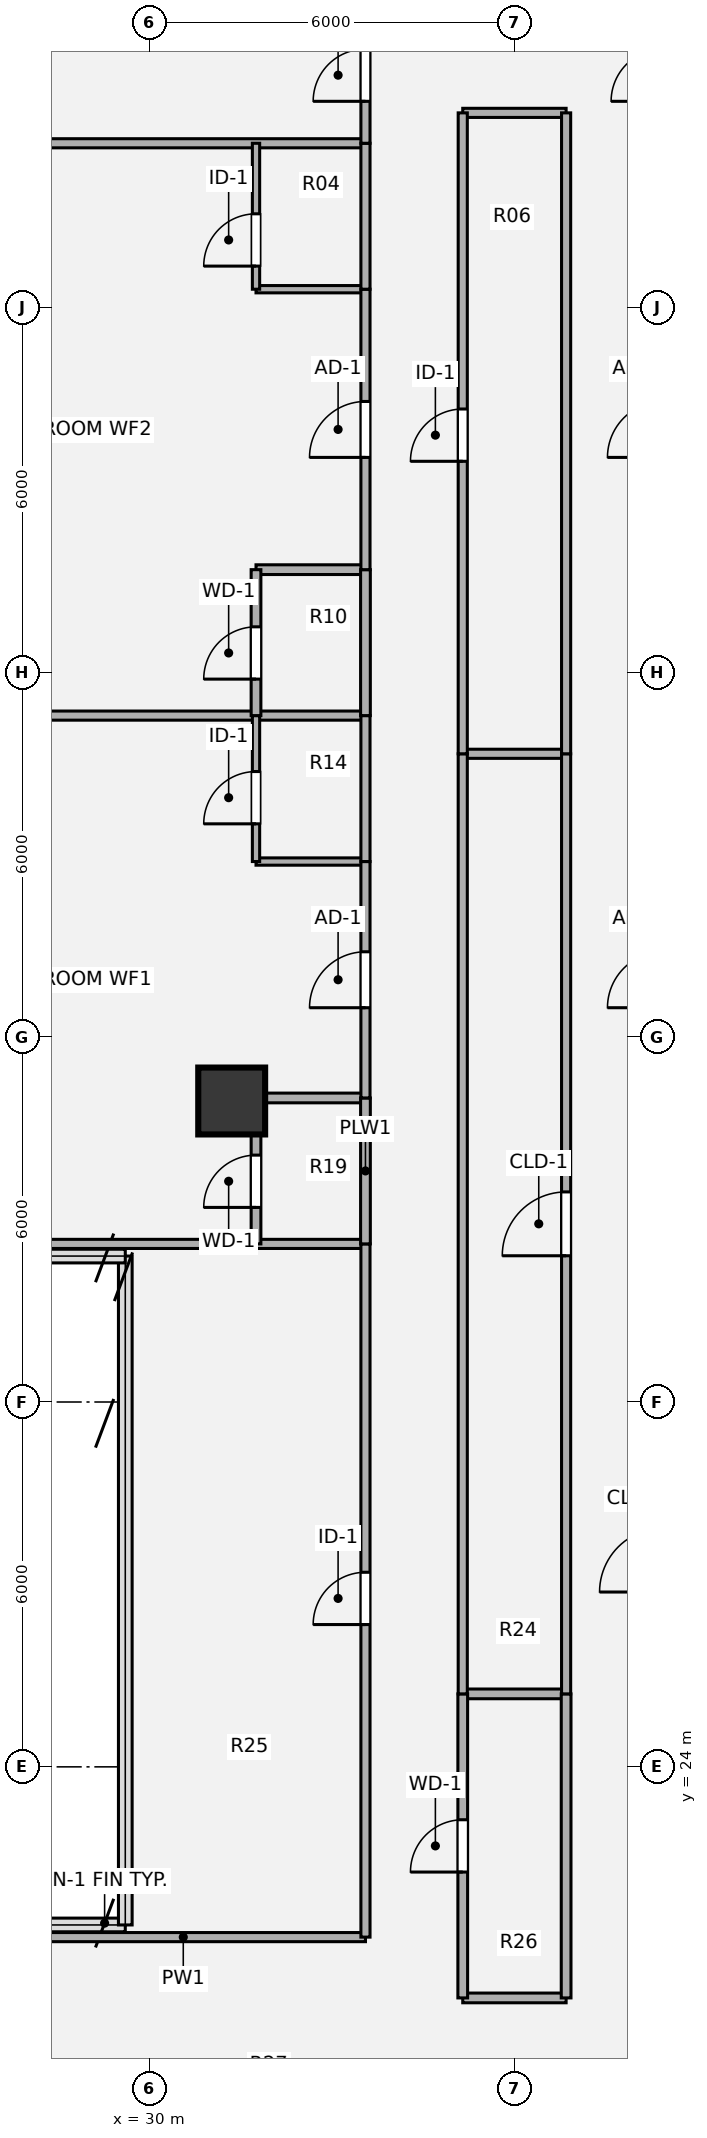
"""IFC4 building model, lengths in metres.
Left out: names, types, materials, properties, quantities, classifications, styles, units other than length and angle.
Written with IfcOpenShell. Run it as: python <this file> out.ifc"""

import sys

from ifc_helpers import new_model, si_unit, direction, frame, frame_2d, origin, origin_2d, place, context, subcontext, project, spatial, rectangle, hollow_circle, extrude, source, transform, mapped, element, fill, save


model = new_model("IFC4")
c1 = context("Model", 3, precision=1e-05, world=origin(), true_north=direction((0.0, 1.0)))
c2 = subcontext(c1, "Body", "Model", "MODEL_VIEW")
j1 = project(units=[si_unit("LENGTHUNIT", "METRE"), si_unit("PLANEANGLEUNIT", "RADIAN")], contexts=[c1])
p1 = place(None, origin())
s1 = spatial("IfcSite", under=j1, at=p1, CompositionType="ELEMENT")
p2 = place(p1, origin())
s2 = spatial("IfcBuilding", under=s1, at=p2, CompositionType="ELEMENT")
p3 = place(p2, frame((0.0, 0.0, 156.42)))
s3 = spatial("IfcBuildingStorey", under=s2, at=p3, CompositionType="ELEMENT", Elevation=156.42)
m1 = source(origin(), c2, "Body", "SweptSolid", [
    extrude(hollow_circle(Radius=0.55, WallThickness=0.04, at=origin_2d()), origin(), (0.0, 0.0, 1.0), 3.78),
])
p4 = place(p3, frame((31.35, 34.95, 0.0), z_axis=(0.0, 0.0, 1.0), x_axis=(1.0, 0.0, 0.0)))
e1 = element("IfcColumn", 1, at=p4, inside=s3, PredefinedType="COLUMN", context=c2, shape_type="MappedRepresentation", body=[
    mapped(m1, transform((0.0, 0.0, 0.0), x_axis=(1.0, 0.0, 0.0), y_axis=(0.0, 1.0, 0.0), z_axis=(0.0, 0.0, 1.0), scale=1.0)),
])
p5 = place(p3, frame((35.15, 20.2, 0.0), z_axis=(0.0, 0.0, 1.0), x_axis=(1.0, 0.0, 0.0)))
e2 = element("IfcWall", 2, at=p5, inside=s3, PredefinedType="PLUMBINGWALL", context=c2, shape_type="SweptSolid", body=[
    extrude(rectangle(XDim=1.7, YDim=0.16, at=frame_2d((0.85, 0.0))), origin(), (0.0, 0.0, 1.0), 3.5),
])
p6 = place(p3, frame((27.558, 21.2, 0.0), z_axis=(0.0, 0.0, 1.0), x_axis=(1.0, 0.0, 0.0)))
e3 = element("IfcWall", 3, at=p6, inside=s3, PredefinedType="PARTITIONING", context=c2, shape_type="SweptSolid", body=[
    extrude(rectangle(XDim=5.992, YDim=0.15, at=frame_2d((2.996, 0.0))), origin(), (0.0, 0.0, 1.0), 3.5),
])
p7 = place(p3, frame((35.15, 25.2, 0.0), z_axis=(0.0, 0.0, 1.0), x_axis=(1.0, 0.0, 0.0)))
e4 = element("IfcWall", 4, at=p7, inside=s3, PredefinedType="PLUMBINGWALL", context=c2, shape_type="SweptSolid", body=[
    extrude(rectangle(XDim=1.7, YDim=0.16, at=frame_2d((0.85, 0.0))), origin(), (0.0, 0.0, 1.0), 3.5),
])
p8 = place(p3, frame((27.557, 32.6, 0.0), z_axis=(0.0, 0.0, 1.0), x_axis=(1.0, 0.0, 0.0)))
e5 = element("IfcWall", 5, at=p8, inside=s3, PredefinedType="PARTITIONING", context=c2, shape_type="SweptSolid", body=[
    extrude(rectangle(XDim=5.993, YDim=0.15, at=frame_2d((2.997, 0.0))), origin(), (0.0, 0.0, 1.0), 3.5),
])
p9 = place(p3, frame((31.75, 35.0, 0.0), z_axis=(0.0, 0.0, 1.0), x_axis=(1.0, 0.0, 0.0)))
e6 = element("IfcWall", 6, at=p9, inside=s3, PredefinedType="PLUMBINGWALL", context=c2, shape_type="SweptSolid", body=[
    extrude(rectangle(XDim=1.8, YDim=0.16, at=frame_2d((0.9, 0.0))), origin(), (0.0, 0.0, 1.0), 2.903),
])
p10 = place(p3, frame((31.75, 38.888, 0.0), z_axis=(0.0, 0.0, 1.0), x_axis=(1.0, 0.0, 0.0)))
e7 = element("IfcWall", 7, at=p10, inside=s3, PredefinedType="PARTITIONING", context=c2, shape_type="SweptSolid", body=[
    extrude(rectangle(XDim=1.8, YDim=0.12, at=frame_2d((0.9, 0.0))), origin(), (0.0, 0.0, 1.0), 3.259),
])
p11 = place(p3, frame((35.15, 40.66, 0.0), z_axis=(0.0, 0.0, 1.0), x_axis=(1.0, 0.0, 0.0)))
e8 = element("IfcWall", 8, at=p11, inside=s3, PredefinedType="PARTITIONING", context=c2, shape_type="SweptSolid", body=[
    extrude(rectangle(XDim=1.7, YDim=0.15, at=frame_2d((0.85, 0.0))), origin(), (0.0, 0.0, 1.0), 3.259),
])
p12 = place(p3, frame((15.88, 41.288, 0.0), z_axis=(0.0, 0.0, 1.0), x_axis=(1.0, 0.0, 0.0)))
e9 = element("IfcWall", 9, at=p12, inside=s3, PredefinedType="PARTITIONING", context=c2, shape_type="SweptSolid", body=[
    extrude(rectangle(XDim=17.67, YDim=0.15, at=frame_2d((8.835, 0.0))), origin(), (0.0, 0.0, 1.0), 2.982),
])
p13 = place(p3, frame((31.75, 43.688, 0.0), z_axis=(0.0, 0.0, 1.0), x_axis=(1.0, 0.0, 0.0)))
e10 = element("IfcWall", 10, at=p13, inside=s3, PredefinedType="PLUMBINGWALL", context=c2, shape_type="SweptSolid", body=[
    extrude(rectangle(XDim=1.8, YDim=0.16, at=frame_2d((0.9, 0.0))), origin(), (0.0, 0.0, 1.0), 3.259),
])
p14 = place(p3, frame((31.75, 48.3, 0.0), z_axis=(0.0, 0.0, 1.0), x_axis=(1.0, 0.0, 0.0)))
e11 = element("IfcWall", 11, at=p14, inside=s3, PredefinedType="PARTITIONING", context=c2, shape_type="SweptSolid", body=[
    extrude(rectangle(XDim=1.8, YDim=0.12, at=frame_2d((0.9, 0.0))), origin(), (0.0, 0.0, 1.0), 3.259),
])
p15 = place(p3, frame((15.981, 50.7, 0.0), z_axis=(0.0, 0.0, 1.0), x_axis=(1.0, 0.0, 0.0)))
e12 = element("IfcWall", 12, at=p15, inside=s3, PredefinedType="PARTITIONING", context=c2, shape_type="SweptSolid", body=[
    extrude(rectangle(XDim=17.569, YDim=0.15, at=frame_2d((8.785, 0.0))), origin(), (0.0, 0.0, 1.0), 3.308),
])
p16 = place(p3, frame((35.15, 51.2, 0.0), z_axis=(0.0, 0.0, 1.0), x_axis=(1.0, 0.0, 0.0)))
e13 = element("IfcWall", 13, at=p16, inside=s3, PredefinedType="PARTITIONING", context=c2, shape_type="SweptSolid", body=[
    extrude(rectangle(XDim=1.7, YDim=0.15, at=frame_2d((0.85, 0.0))), origin(), (0.0, 0.0, 1.0), 3.308),
])
p17 = place(p3, frame((31.75, 32.6, 0.0), z_axis=(0.0, 0.0, 1.0), x_axis=(0.0, 1.0, 0.0)))
e14 = element("IfcWall", 14, at=p17, inside=s3, PredefinedType="PLUMBINGWALL", context=c2, shape_type="SweptSolid", body=[
    extrude(rectangle(XDim=2.4, YDim=0.16, at=frame_2d((1.2, 0.0))), origin(), (0.0, 0.0, 1.0), 3.5),
])
p18 = place(p17, frame((0.6, 0.0, 0.0)))
e15 = element("IfcOpeningElement", 15, at=p18, cuts=e14, PredefinedType="OPENING", context=c2, shape_type="SweptSolid", body=[
    extrude(rectangle(XDim=0.86, YDim=2.1, at=origin_2d()), frame((0.43, 0.09, 1.05), z_axis=(0.0, -1.0, 0.0), x_axis=(1.0, 0.0, 0.0)), (0.0, 0.0, 1.0), 0.18),
])
p19 = place(p3, frame((31.75, 38.888, 0.0), z_axis=(0.0, 0.0, 1.0), x_axis=(0.0, 1.0, 0.0)))
e16 = element("IfcWall", 16, at=p19, inside=s3, PredefinedType="PARTITIONING", context=c2, shape_type="SweptSolid", body=[
    extrude(rectangle(XDim=2.4, YDim=0.12, at=frame_2d((1.2, 0.0))), origin(), (0.0, 0.0, 1.0), 3.5),
])
p20 = place(p19, frame((0.62, 0.0, 0.0)))
e17 = element("IfcOpeningElement", 17, at=p20, cuts=e16, PredefinedType="OPENING", context=c2, shape_type="SweptSolid", body=[
    extrude(rectangle(XDim=0.86, YDim=2.1, at=origin_2d()), frame((0.43, 0.07, 1.05), z_axis=(0.0, -1.0, 0.0), x_axis=(1.0, 0.0, 0.0)), (0.0, 0.0, 1.0), 0.14),
])
p21 = place(p3, frame((31.75, 41.288, 0.0), z_axis=(0.0, 0.0, 1.0), x_axis=(0.0, 1.0, 0.0)))
e18 = element("IfcWall", 18, at=p21, inside=s3, PredefinedType="PLUMBINGWALL", context=c2, shape_type="SweptSolid", body=[
    extrude(rectangle(XDim=2.4, YDim=0.16, at=frame_2d((1.2, 0.0))), origin(), (0.0, 0.0, 1.0), 3.5),
])
p22 = place(p21, frame((0.6, 0.0, 0.0)))
e19 = element("IfcOpeningElement", 19, at=p22, cuts=e18, PredefinedType="OPENING", context=c2, shape_type="SweptSolid", body=[
    extrude(rectangle(XDim=0.86, YDim=2.1, at=origin_2d()), frame((0.43, 0.09, 1.05), z_axis=(0.0, -1.0, 0.0), x_axis=(1.0, 0.0, 0.0)), (0.0, 0.0, 1.0), 0.18),
])
p23 = place(p3, frame((31.75, 48.3, 0.0), z_axis=(0.0, 0.0, 1.0), x_axis=(0.0, 1.0, 0.0)))
e20 = element("IfcWall", 20, at=p23, inside=s3, PredefinedType="PARTITIONING", context=c2, shape_type="SweptSolid", body=[
    extrude(rectangle(XDim=2.4, YDim=0.12, at=frame_2d((1.2, 0.0))), origin(), (0.0, 0.0, 1.0), 3.5),
])
p24 = place(p23, frame((0.38, 0.0, 0.0)))
e21 = element("IfcOpeningElement", 21, at=p24, cuts=e20, PredefinedType="OPENING", context=c2, shape_type="SweptSolid", body=[
    extrude(rectangle(XDim=0.86, YDim=2.1, at=origin_2d()), frame((0.43, 0.07, 1.05), z_axis=(0.0, -1.0, 0.0), x_axis=(1.0, 0.0, 0.0)), (0.0, 0.0, 1.0), 0.14),
])
p25 = place(p3, frame((33.55, 21.2, 0.0), z_axis=(0.0, 0.0, 1.0), x_axis=(0.0, 1.0, 0.0)))
e22 = element("IfcWall", 22, at=p25, inside=s3, PredefinedType="PARTITIONING", context=c2, shape_type="SweptSolid", body=[
    extrude(rectangle(XDim=11.4, YDim=0.15, at=frame_2d((5.7, 0.0))), origin(), (0.0, 0.0, 1.0), 3.5),
])
p26 = place(p25, frame((5.14, 0.0, 0.0)))
e23 = element("IfcOpeningElement", 23, at=p26, cuts=e22, PredefinedType="OPENING", context=c2, shape_type="SweptSolid", body=[
    extrude(rectangle(XDim=0.86, YDim=2.1, at=origin_2d()), frame((0.43, 0.085, 1.05), z_axis=(0.0, -1.0, 0.0), x_axis=(1.0, 0.0, 0.0)), (0.0, 0.0, 1.0), 0.17),
])
p27 = place(p3, frame((33.55, 32.6, 0.0), z_axis=(0.0, 0.0, 1.0), x_axis=(0.0, 1.0, 0.0)))
e24 = element("IfcWall", 24, at=p27, inside=s3, PredefinedType="PLUMBINGWALL", context=c2, shape_type="SweptSolid", body=[
    extrude(rectangle(XDim=2.4, YDim=0.16, at=frame_2d((1.2, 0.0))), origin(), (0.0, 0.0, 1.0), 3.5),
])
p28 = place(p3, frame((33.55, 35.0, 0.0), z_axis=(0.0, 0.0, 1.0), x_axis=(0.0, 1.0, 0.0)))
e25 = element("IfcWall", 25, at=p28, inside=s3, PredefinedType="PARTITIONING", context=c2, shape_type="SweptSolid", body=[
    extrude(rectangle(XDim=3.888, YDim=0.15, at=frame_2d((1.944, 0.0))), origin(), (0.0, 0.0, 1.0), 3.5),
])
p29 = place(p28, frame((1.484, 0.0, 0.0)))
e26 = element("IfcOpeningElement", 26, at=p29, cuts=e25, PredefinedType="OPENING", context=c2, shape_type="SweptSolid", body=[
    extrude(rectangle(XDim=0.92, YDim=2.1, at=origin_2d()), frame((0.46, 0.085, 1.05), z_axis=(0.0, -1.0, 0.0), x_axis=(1.0, 0.0, 0.0)), (0.0, 0.0, 1.0), 0.17),
])
p30 = place(p3, frame((33.55, 38.888, 0.0), z_axis=(0.0, 0.0, 1.0), x_axis=(0.0, 1.0, 0.0)))
e27 = element("IfcWall", 27, at=p30, inside=s3, PredefinedType="PARTITIONING", context=c2, shape_type="SweptSolid", body=[
    extrude(rectangle(XDim=2.4, YDim=0.15, at=frame_2d((1.2, 0.0))), origin(), (0.0, 0.0, 1.0), 3.5),
])
p31 = place(p3, frame((33.55, 41.288, 0.0), z_axis=(0.0, 0.0, 1.0), x_axis=(0.0, 1.0, 0.0)))
e28 = element("IfcWall", 28, at=p31, inside=s3, PredefinedType="PLUMBINGWALL", context=c2, shape_type="SweptSolid", body=[
    extrude(rectangle(XDim=2.4, YDim=0.16, at=frame_2d((1.2, 0.0))), origin(), (0.0, 0.0, 1.0), 3.5),
])
p32 = place(p3, frame((33.55, 43.688, 0.0), z_axis=(0.0, 0.0, 1.0), x_axis=(0.0, 1.0, 0.0)))
e29 = element("IfcWall", 29, at=p32, inside=s3, PredefinedType="PARTITIONING", context=c2, shape_type="SweptSolid", body=[
    extrude(rectangle(XDim=4.612, YDim=0.15, at=frame_2d((2.306, 0.0))), origin(), (0.0, 0.0, 1.0), 3.5),
])
p33 = place(p32, frame((1.846, 0.0, 0.0)))
e30 = element("IfcOpeningElement", 30, at=p33, cuts=e29, PredefinedType="OPENING", context=c2, shape_type="SweptSolid", body=[
    extrude(rectangle(XDim=0.92, YDim=2.1, at=origin_2d()), frame((0.46, 0.085, 1.05), z_axis=(0.0, -1.0, 0.0), x_axis=(1.0, 0.0, 0.0)), (0.0, 0.0, 1.0), 0.17),
])
p34 = place(p3, frame((33.55, 48.3, 0.0), z_axis=(0.0, 0.0, 1.0), x_axis=(0.0, 1.0, 0.0)))
e31 = element("IfcWall", 31, at=p34, inside=s3, PredefinedType="PARTITIONING", context=c2, shape_type="SweptSolid", body=[
    extrude(rectangle(XDim=2.4, YDim=0.15, at=frame_2d((1.2, 0.0))), origin(), (0.0, 0.0, 1.0), 3.5),
])
p35 = place(p3, frame((33.55, 50.7, 0.0), z_axis=(0.0, 0.0, 1.0), x_axis=(0.0, 1.0, 0.0)))
e32 = element("IfcWall", 32, at=p35, inside=s3, PredefinedType="PARTITIONING", context=c2, shape_type="SweptSolid", body=[
    extrude(rectangle(XDim=2.3, YDim=0.15, at=frame_2d((1.15, 0.0))), origin(), (0.0, 0.0, 1.0), 3.5),
])
p36 = place(p35, frame((0.69, 0.0, 0.0)))
e33 = element("IfcOpeningElement", 33, at=p36, cuts=e32, PredefinedType="OPENING", context=c2, shape_type="SweptSolid", body=[
    extrude(rectangle(XDim=0.86, YDim=2.1, at=origin_2d()), frame((0.43, 0.085, 1.05), z_axis=(0.0, -1.0, 0.0), x_axis=(1.0, 0.0, 0.0)), (0.0, 0.0, 1.0), 0.17),
])
p37 = place(p3, frame((35.15, 20.2, 0.0), z_axis=(0.0, 0.0, 1.0), x_axis=(0.0, 1.0, 0.0)))
e34 = element("IfcWall", 34, at=p37, inside=s3, PredefinedType="PLUMBINGWALL", context=c2, shape_type="SweptSolid", body=[
    extrude(rectangle(XDim=5.0, YDim=0.16, at=frame_2d((2.5, 0.0))), origin(), (0.0, 0.0, 1.0), 3.5),
])
p38 = place(p37, frame((2.07, 0.0, 0.0)))
e35 = element("IfcOpeningElement", 35, at=p38, cuts=e34, PredefinedType="OPENING", context=c2, shape_type="SweptSolid", body=[
    extrude(rectangle(XDim=0.86, YDim=2.1, at=origin_2d()), frame((0.43, 0.09, 1.05), z_axis=(0.0, -1.0, 0.0), x_axis=(1.0, 0.0, 0.0)), (0.0, 0.0, 1.0), 0.18),
])
p39 = place(p3, frame((35.15, 25.2, 0.0), z_axis=(0.0, 0.0, 1.0), x_axis=(0.0, 1.0, 0.0)))
e36 = element("IfcWall", 36, at=p39, inside=s3, PredefinedType="PARTITIONING", context=c2, shape_type="SweptSolid", body=[
    extrude(rectangle(XDim=15.46, YDim=0.15, at=frame_2d((7.73, 0.0))), origin(), (0.0, 0.0, 1.0), 3.5),
])
p40 = place(p3, frame((35.15, 40.66, 0.0), z_axis=(0.0, 0.0, 1.0), x_axis=(0.0, 1.0, 0.0)))
e37 = element("IfcWall", 37, at=p40, inside=s3, PredefinedType="PARTITIONING", context=c2, shape_type="SweptSolid", body=[
    extrude(rectangle(XDim=10.54, YDim=0.15, at=frame_2d((5.27, 0.0))), origin(), (0.0, 0.0, 1.0), 3.5),
])
p41 = place(p40, frame((4.81, 0.0, 0.0)))
e38 = element("IfcOpeningElement", 38, at=p41, cuts=e37, PredefinedType="OPENING", context=c2, shape_type="SweptSolid", body=[
    extrude(rectangle(XDim=0.86, YDim=2.1, at=origin_2d()), frame((0.43, 0.085, 1.05), z_axis=(0.0, -1.0, 0.0), x_axis=(1.0, 0.0, 0.0)), (0.0, 0.0, 1.0), 0.17),
])
p42 = place(p3, frame((36.85, 20.2, 0.0), z_axis=(0.0, 0.0, 1.0), x_axis=(0.0, 1.0, 0.0)))
e39 = element("IfcWall", 39, at=p42, inside=s3, PredefinedType="PLUMBINGWALL", context=c2, shape_type="SweptSolid", body=[
    extrude(rectangle(XDim=5.0, YDim=0.16, at=frame_2d((2.5, 0.0))), origin(), (0.0, 0.0, 1.0), 3.5),
])
p43 = place(p3, frame((36.85, 25.2, 0.0), z_axis=(0.0, 0.0, 1.0), x_axis=(0.0, 1.0, 0.0)))
e40 = element("IfcWall", 40, at=p43, inside=s3, PredefinedType="PARTITIONING", context=c2, shape_type="SweptSolid", body=[
    extrude(rectangle(XDim=15.46, YDim=0.15, at=frame_2d((7.73, 0.0))), origin(), (0.0, 0.0, 1.0), 3.5),
])
p44 = place(p43, frame((7.205, 0.0, 0.0)))
e41 = element("IfcOpeningElement", 41, at=p44, cuts=e40, PredefinedType="OPENING", context=c2, shape_type="SweptSolid", body=[
    extrude(rectangle(XDim=1.05, YDim=2.1, at=origin_2d()), frame((0.525, 0.085, 1.05), z_axis=(0.0, -1.0, 0.0), x_axis=(1.0, 0.0, 0.0)), (0.0, 0.0, 1.0), 0.17),
])
p45 = place(p3, frame((36.85, 40.66, 0.0), z_axis=(0.0, 0.0, 1.0), x_axis=(0.0, 1.0, 0.0)))
e42 = element("IfcWall", 42, at=p45, inside=s3, PredefinedType="PARTITIONING", context=c2, shape_type="SweptSolid", body=[
    extrude(rectangle(XDim=10.54, YDim=0.15, at=frame_2d((5.27, 0.0))), origin(), (0.0, 0.0, 1.0), 3.5),
])
m2 = source(origin(), c2, "Body", "SweptSolid", [
    extrude(rectangle(XDim=0.86, YDim=2.1, at=origin_2d()), frame((0.43, 0.025, 1.05), z_axis=(0.0, -1.0, 0.0), x_axis=(1.0, 0.0, 0.0)), (0.0, 0.0, 1.0), 0.05),
])
p46 = place(p18, origin())
e43 = element("IfcDoor", 43, at=p46, inside=s3, OperationType="SINGLE_SWING_LEFT", PredefinedType="DOOR", context=c2, shape_type="MappedRepresentation", body=[
    mapped(m2, transform((0.0, 0.0, 0.0), x_axis=(1.0, 0.0, 0.0), y_axis=(0.0, 1.0, 0.0), z_axis=(0.0, 0.0, 1.0), scale=1.0)),
])
fill(e15, e43)
m3 = source(origin(), c2, "Body", "SweptSolid", [
    extrude(rectangle(XDim=0.86, YDim=2.1, at=origin_2d()), frame((0.43, 0.025, 1.05), z_axis=(0.0, -1.0, 0.0), x_axis=(1.0, 0.0, 0.0)), (0.0, 0.0, 1.0), 0.05),
])
p47 = place(p20, origin())
e44 = element("IfcDoor", 44, at=p47, inside=s3, OperationType="SINGLE_SWING_LEFT", PredefinedType="DOOR", context=c2, shape_type="MappedRepresentation", body=[
    mapped(m3, transform((0.0, 0.0, 0.0), x_axis=(1.0, 0.0, 0.0), y_axis=(0.0, 1.0, 0.0), z_axis=(0.0, 0.0, 1.0), scale=1.0)),
])
fill(e17, e44)
p48 = place(p22, origin())
e45 = element("IfcDoor", 45, at=p48, inside=s3, OperationType="SINGLE_SWING_LEFT", PredefinedType="DOOR", context=c2, shape_type="MappedRepresentation", body=[
    mapped(m2, transform((0.0, 0.0, 0.0), x_axis=(1.0, 0.0, 0.0), y_axis=(0.0, 1.0, 0.0), z_axis=(0.0, 0.0, 1.0), scale=1.0)),
])
fill(e19, e45)
p49 = place(p24, origin())
e46 = element("IfcDoor", 46, at=p49, inside=s3, OperationType="SINGLE_SWING_LEFT", PredefinedType="DOOR", context=c2, shape_type="MappedRepresentation", body=[
    mapped(m3, transform((0.0, 0.0, 0.0), x_axis=(1.0, 0.0, 0.0), y_axis=(0.0, 1.0, 0.0), z_axis=(0.0, 0.0, 1.0), scale=1.0)),
])
fill(e21, e46)
p50 = place(p26, origin())
e47 = element("IfcDoor", 47, at=p50, inside=s3, OperationType="SINGLE_SWING_LEFT", PredefinedType="DOOR", context=c2, shape_type="MappedRepresentation", body=[
    mapped(m3, transform((0.0, 0.0, 0.0), x_axis=(1.0, 0.0, 0.0), y_axis=(0.0, 1.0, 0.0), z_axis=(0.0, 0.0, 1.0), scale=1.0)),
])
fill(e23, e47)
m4 = source(origin(), c2, "Body", "SweptSolid", [
    extrude(rectangle(XDim=0.92, YDim=2.1, at=origin_2d()), frame((0.46, 0.025, 1.05), z_axis=(0.0, -1.0, 0.0), x_axis=(1.0, 0.0, 0.0)), (0.0, 0.0, 1.0), 0.05),
])
p51 = place(p29, origin())
e48 = element("IfcDoor", 48, at=p51, inside=s3, OperationType="SINGLE_SWING_LEFT", PredefinedType="DOOR", context=c2, shape_type="MappedRepresentation", body=[
    mapped(m4, transform((0.0, 0.0, 0.0), x_axis=(1.0, 0.0, 0.0), y_axis=(0.0, 1.0, 0.0), z_axis=(0.0, 0.0, 1.0), scale=1.0)),
])
fill(e26, e48)
p52 = place(p33, origin())
e49 = element("IfcDoor", 49, at=p52, inside=s3, OperationType="SINGLE_SWING_LEFT", PredefinedType="DOOR", context=c2, shape_type="MappedRepresentation", body=[
    mapped(m4, transform((0.0, 0.0, 0.0), x_axis=(1.0, 0.0, 0.0), y_axis=(0.0, 1.0, 0.0), z_axis=(0.0, 0.0, 1.0), scale=1.0)),
])
fill(e30, e49)
p53 = place(p36, origin())
e50 = element("IfcDoor", 50, at=p53, inside=s3, OperationType="SINGLE_SWING_LEFT", PredefinedType="DOOR", context=c2, shape_type="MappedRepresentation", body=[
    mapped(m3, transform((0.0, 0.0, 0.0), x_axis=(1.0, 0.0, 0.0), y_axis=(0.0, 1.0, 0.0), z_axis=(0.0, 0.0, 1.0), scale=1.0)),
])
fill(e33, e50)
p54 = place(p38, origin())
e51 = element("IfcDoor", 51, at=p54, inside=s3, OperationType="SINGLE_SWING_LEFT", PredefinedType="DOOR", context=c2, shape_type="MappedRepresentation", body=[
    mapped(m2, transform((0.0, 0.0, 0.0), x_axis=(1.0, 0.0, 0.0), y_axis=(0.0, 1.0, 0.0), z_axis=(0.0, 0.0, 1.0), scale=1.0)),
])
fill(e35, e51)
p55 = place(p41, origin())
e52 = element("IfcDoor", 52, at=p55, inside=s3, OperationType="SINGLE_SWING_LEFT", PredefinedType="DOOR", context=c2, shape_type="MappedRepresentation", body=[
    mapped(m3, transform((0.0, 0.0, 0.0), x_axis=(1.0, 0.0, 0.0), y_axis=(0.0, 1.0, 0.0), z_axis=(0.0, 0.0, 1.0), scale=1.0)),
])
fill(e38, e52)
m5 = source(origin(), c2, "Body", "SweptSolid", [
    extrude(rectangle(XDim=1.05, YDim=2.1, at=origin_2d()), frame((0.525, 0.025, 1.05), z_axis=(0.0, -1.0, 0.0), x_axis=(1.0, 0.0, 0.0)), (0.0, 0.0, 1.0), 0.05),
])
p56 = place(p44, origin())
e53 = element("IfcDoor", 53, at=p56, inside=s3, OperationType="SINGLE_SWING_LEFT", PredefinedType="DOOR", context=c2, shape_type="MappedRepresentation", body=[
    mapped(m5, transform((0.0, 0.0, 0.0), x_axis=(1.0, 0.0, 0.0), y_axis=(0.0, 1.0, 0.0), z_axis=(0.0, 0.0, 1.0), scale=1.0)),
])
fill(e41, e53)
save(model, sys.argv[1])
